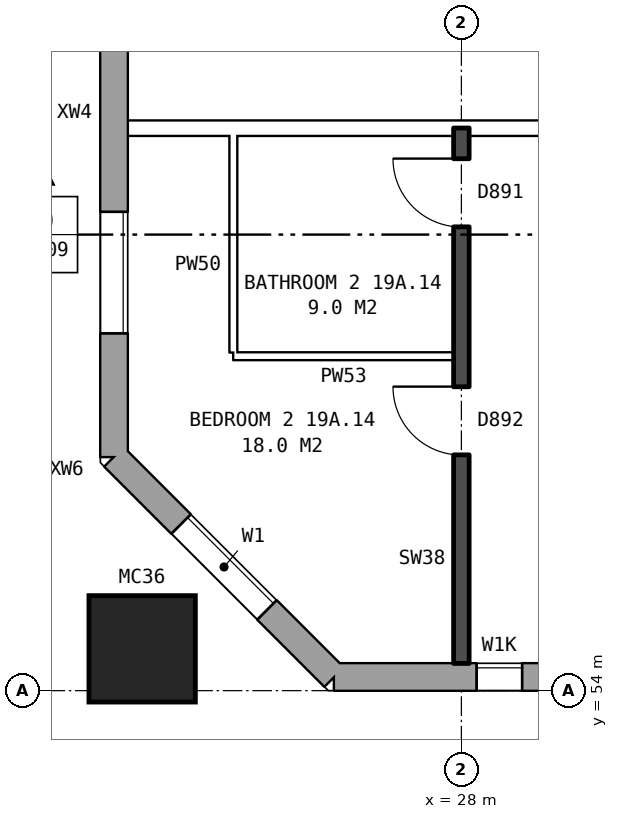
"""IFC4 building model, lengths in metres.
Left out: names, types, materials, properties, quantities, classifications, styles, units other than length and angle.
Written with IfcOpenShell. Run it as: python <this file> out.ifc"""

import sys

from ifc_helpers import new_model, si_unit, direction, frame, frame_2d, origin, origin_2d, place, context, subcontext, project, spatial, rectangle, hollow_rectangle, extrude, element, fill, save


model = new_model("IFC4")
c1 = context("Model", 3, precision=1e-05, world=origin(), true_north=direction((0.0, 1.0)))
c2 = subcontext(c1, "Body", "Model", "MODEL_VIEW")
j1 = project(units=[si_unit("LENGTHUNIT", "METRE"), si_unit("PLANEANGLEUNIT", "RADIAN")], contexts=[c1])
p1 = place(None, origin())
s1 = spatial("IfcSite", under=j1, at=p1, CompositionType="ELEMENT")
p2 = place(p1, origin())
s2 = spatial("IfcBuilding", under=s1, at=p2, CompositionType="ELEMENT")
p3 = place(p2, frame((0.0, 0.0, 71.6)))
s3 = spatial("IfcBuildingStorey", under=s2, at=p3, CompositionType="ELEMENT", Elevation=71.6)
p4 = place(p3, frame((23.8, 54.55, 0.0), z_axis=(0.0, 0.0, 1.0), x_axis=(1.0, 0.0, 0.0)))
e1 = element("IfcColumn", 1, at=p4, inside=s3, PredefinedType="COLUMN", context=c2, shape_type="SweptSolid", body=[
    extrude(hollow_rectangle(XDim=1.4, YDim=1.4, WallThickness=0.075, at=origin_2d()), origin(), (0.0, 0.0, 1.0), 3.1),
])
p5 = place(p3, frame((23.43, 57.075, 0.0), z_axis=(0.0, 0.0, 1.0), x_axis=(0.707106781187, -0.707106781187, 0.0)))
e2 = element("IfcWall", 2, at=p5, inside=s3, PredefinedType="STANDARD", context=c2, shape_type="SweptSolid", body=[
    extrude(rectangle(XDim=4.094, YDim=0.36, at=frame_2d((2.047, 0.0))), origin(), (0.0, 0.0, 1.0), 2.85),
])
p6 = place(p5, frame((1.247, 0.0, 0.8)))
e3 = element("IfcOpeningElement", 3, at=p6, cuts=e2, PredefinedType="OPENING", context=c2, shape_type="SweptSolid", body=[
    extrude(rectangle(XDim=1.6, YDim=1.8, at=frame_2d((0.8, 0.9))), frame((0.0, 0.19, 0.0), z_axis=(0.0, -1.0, 0.0), x_axis=(1.0, 0.0, 0.0)), (0.0, 0.0, 1.0), 0.38),
])
p7 = place(p3, frame((26.325, 54.18, 0.0), z_axis=(0.0, 0.0, 1.0), x_axis=(1.0, 0.0, 0.0)))
e4 = element("IfcWall", 4, at=p7, inside=s3, PredefinedType="STANDARD", context=c2, shape_type="SweptSolid", body=[
    extrude(rectangle(XDim=46.601, YDim=0.36, at=frame_2d((23.3, 0.0))), origin(), (0.0, 0.0, 1.0), 2.85),
])
p8 = place(p7, frame((1.875, 0.0, 1.0)))
e5 = element("IfcOpeningElement", 5, at=p8, cuts=e4, PredefinedType="OPENING", context=c2, shape_type="SweptSolid", body=[
    extrude(rectangle(XDim=0.6, YDim=1.5, at=frame_2d((0.3, 0.75))), frame((0.0, 0.19, 0.0), z_axis=(0.0, -1.0, 0.0), x_axis=(1.0, 0.0, 0.0)), (0.0, 0.0, 1.0), 0.38),
])
p9 = place(p7, frame((5.375, 0.0, 0.8)))
e6 = element("IfcOpeningElement", 6, at=p9, cuts=e4, PredefinedType="OPENING", context=c2, shape_type="SweptSolid", body=[
    extrude(rectangle(XDim=1.6, YDim=1.8, at=frame_2d((0.8, 0.9))), frame((0.0, 0.19, 0.0), z_axis=(0.0, -1.0, 0.0), x_axis=(1.0, 0.0, 0.0)), (0.0, 0.0, 1.0), 0.38),
])
p10 = place(p7, frame((8.375, 0.0, 0.8)))
e7 = element("IfcOpeningElement", 7, at=p10, cuts=e4, PredefinedType="OPENING", context=c2, shape_type="SweptSolid", body=[
    extrude(rectangle(XDim=1.6, YDim=1.8, at=frame_2d((0.8, 0.9))), frame((0.0, 0.19, 0.0), z_axis=(0.0, -1.0, 0.0), x_axis=(1.0, 0.0, 0.0)), (0.0, 0.0, 1.0), 0.38),
])
p11 = place(p7, frame((11.375, 0.0, 0.8)))
e8 = element("IfcOpeningElement", 8, at=p11, cuts=e4, PredefinedType="OPENING", context=c2, shape_type="SweptSolid", body=[
    extrude(rectangle(XDim=1.6, YDim=1.8, at=frame_2d((0.8, 0.9))), frame((0.0, 0.19, 0.0), z_axis=(0.0, -1.0, 0.0), x_axis=(1.0, 0.0, 0.0)), (0.0, 0.0, 1.0), 0.38),
])
p12 = place(p7, frame((14.375, 0.0, 0.8)))
e9 = element("IfcOpeningElement", 9, at=p12, cuts=e4, PredefinedType="OPENING", context=c2, shape_type="SweptSolid", body=[
    extrude(rectangle(XDim=1.6, YDim=1.8, at=frame_2d((0.8, 0.9))), frame((0.0, 0.19, 0.0), z_axis=(0.0, -1.0, 0.0), x_axis=(1.0, 0.0, 0.0)), (0.0, 0.0, 1.0), 0.38),
])
p13 = place(p7, frame((17.375, 0.0, 0.8)))
e10 = element("IfcOpeningElement", 10, at=p13, cuts=e4, PredefinedType="OPENING", context=c2, shape_type="SweptSolid", body=[
    extrude(rectangle(XDim=1.6, YDim=1.8, at=frame_2d((0.8, 0.9))), frame((0.0, 0.19, 0.0), z_axis=(0.0, -1.0, 0.0), x_axis=(1.0, 0.0, 0.0)), (0.0, 0.0, 1.0), 0.38),
])
p14 = place(p7, frame((20.375, 0.0, 0.8)))
e11 = element("IfcOpeningElement", 11, at=p14, cuts=e4, PredefinedType="OPENING", context=c2, shape_type="SweptSolid", body=[
    extrude(rectangle(XDim=1.6, YDim=1.8, at=frame_2d((0.8, 0.9))), frame((0.0, 0.19, 0.0), z_axis=(0.0, -1.0, 0.0), x_axis=(1.0, 0.0, 0.0)), (0.0, 0.0, 1.0), 0.38),
])
p15 = place(p7, frame((23.375, 0.0, 0.8)))
e12 = element("IfcOpeningElement", 12, at=p15, cuts=e4, PredefinedType="OPENING", context=c2, shape_type="SweptSolid", body=[
    extrude(rectangle(XDim=1.6, YDim=1.8, at=frame_2d((0.8, 0.9))), frame((0.0, 0.19, 0.0), z_axis=(0.0, -1.0, 0.0), x_axis=(1.0, 0.0, 0.0)), (0.0, 0.0, 1.0), 0.38),
])
p16 = place(p7, frame((26.375, 0.0, 0.8)))
e13 = element("IfcOpeningElement", 13, at=p16, cuts=e4, PredefinedType="OPENING", context=c2, shape_type="SweptSolid", body=[
    extrude(rectangle(XDim=1.6, YDim=1.8, at=frame_2d((0.8, 0.9))), frame((0.0, 0.19, 0.0), z_axis=(0.0, -1.0, 0.0), x_axis=(1.0, 0.0, 0.0)), (0.0, 0.0, 1.0), 0.38),
])
p17 = place(p7, frame((29.375, 0.0, 0.8)))
e14 = element("IfcOpeningElement", 14, at=p17, cuts=e4, PredefinedType="OPENING", context=c2, shape_type="SweptSolid", body=[
    extrude(rectangle(XDim=1.6, YDim=1.8, at=frame_2d((0.8, 0.9))), frame((0.0, 0.19, 0.0), z_axis=(0.0, -1.0, 0.0), x_axis=(1.0, 0.0, 0.0)), (0.0, 0.0, 1.0), 0.38),
])
p18 = place(p7, frame((32.375, 0.0, 0.8)))
e15 = element("IfcOpeningElement", 15, at=p18, cuts=e4, PredefinedType="OPENING", context=c2, shape_type="SweptSolid", body=[
    extrude(rectangle(XDim=1.6, YDim=1.8, at=frame_2d((0.8, 0.9))), frame((0.0, 0.19, 0.0), z_axis=(0.0, -1.0, 0.0), x_axis=(1.0, 0.0, 0.0)), (0.0, 0.0, 1.0), 0.38),
])
p19 = place(p7, frame((35.375, 0.0, 0.8)))
e16 = element("IfcOpeningElement", 16, at=p19, cuts=e4, PredefinedType="OPENING", context=c2, shape_type="SweptSolid", body=[
    extrude(rectangle(XDim=1.6, YDim=1.8, at=frame_2d((0.8, 0.9))), frame((0.0, 0.19, 0.0), z_axis=(0.0, -1.0, 0.0), x_axis=(1.0, 0.0, 0.0)), (0.0, 0.0, 1.0), 0.38),
])
p20 = place(p7, frame((38.375, 0.0, 0.8)))
e17 = element("IfcOpeningElement", 17, at=p20, cuts=e4, PredefinedType="OPENING", context=c2, shape_type="SweptSolid", body=[
    extrude(rectangle(XDim=1.6, YDim=1.8, at=frame_2d((0.8, 0.9))), frame((0.0, 0.19, 0.0), z_axis=(0.0, -1.0, 0.0), x_axis=(1.0, 0.0, 0.0)), (0.0, 0.0, 1.0), 0.38),
])
p21 = place(p7, frame((40.275, 0.0, 0.8)))
e18 = element("IfcOpeningElement", 18, at=p21, cuts=e4, PredefinedType="OPENING", context=c2, shape_type="SweptSolid", body=[
    extrude(rectangle(XDim=0.6, YDim=1.8, at=frame_2d((0.3, 0.9))), frame((0.0, 0.19, 0.0), z_axis=(0.0, -1.0, 0.0), x_axis=(1.0, 0.0, 0.0)), (0.0, 0.0, 1.0), 0.38),
])
p22 = place(p7, frame((44.375, 0.0, 0.8)))
e19 = element("IfcOpeningElement", 19, at=p22, cuts=e4, PredefinedType="OPENING", context=c2, shape_type="SweptSolid", body=[
    extrude(rectangle(XDim=1.6, YDim=1.8, at=frame_2d((0.8, 0.9))), frame((0.0, 0.19, 0.0), z_axis=(0.0, -1.0, 0.0), x_axis=(1.0, 0.0, 0.0)), (0.0, 0.0, 1.0), 0.38),
])
p23 = place(p7, frame((2.775, 0.0, 1.7)))
e20 = element("IfcOpeningElement", 20, at=p23, cuts=e4, PredefinedType="OPENING", context=c2, shape_type="SweptSolid", body=[
    extrude(rectangle(XDim=0.6, YDim=0.9, at=frame_2d((0.3, 0.45))), frame((0.0, 0.19, 0.0), z_axis=(0.0, -1.0, 0.0), x_axis=(1.0, 0.0, 0.0)), (0.0, 0.0, 1.0), 0.38),
])
p24 = place(p7, frame((41.175, 0.0, 0.8)))
e21 = element("IfcOpeningElement", 21, at=p24, cuts=e4, PredefinedType="OPENING", context=c2, shape_type="SweptSolid", body=[
    extrude(rectangle(XDim=0.8, YDim=0.9, at=frame_2d((0.4, 0.45))), frame((0.0, 0.19, 0.0), z_axis=(0.0, -1.0, 0.0), x_axis=(1.0, 0.0, 0.0)), (0.0, 0.0, 1.0), 0.38),
])
p25 = place(p3, frame((23.43, 82.925, 0.0), z_axis=(0.0, 0.0, 1.0), x_axis=(0.0, -1.0, 0.0)))
e22 = element("IfcWall", 22, at=p25, inside=s3, PredefinedType="STANDARD", context=c2, shape_type="SweptSolid", body=[
    extrude(rectangle(XDim=25.851, YDim=0.36, at=frame_2d((12.925, 0.0))), origin(), (0.0, 0.0, 1.0), 2.85),
])
p26 = place(p25, frame((1.625, 0.0, 0.8)))
e23 = element("IfcOpeningElement", 23, at=p26, cuts=e22, PredefinedType="OPENING", context=c2, shape_type="SweptSolid", body=[
    extrude(rectangle(XDim=1.6, YDim=1.8, at=frame_2d((0.8, 0.9))), frame((0.0, 0.19, 0.0), z_axis=(0.0, -1.0, 0.0), x_axis=(1.0, 0.0, 0.0)), (0.0, 0.0, 1.0), 0.38),
])
p27 = place(p25, frame((5.775, 0.0, 0.8)))
e24 = element("IfcOpeningElement", 24, at=p27, cuts=e22, PredefinedType="OPENING", context=c2, shape_type="SweptSolid", body=[
    extrude(rectangle(XDim=0.6, YDim=0.9, at=frame_2d((0.3, 0.45))), frame((0.0, 0.19, 0.0), z_axis=(0.0, -1.0, 0.0), x_axis=(1.0, 0.0, 0.0)), (0.0, 0.0, 1.0), 0.38),
])
p28 = place(p25, frame((7.625, 0.0, 0.8)))
e25 = element("IfcOpeningElement", 25, at=p28, cuts=e22, PredefinedType="OPENING", context=c2, shape_type="SweptSolid", body=[
    extrude(rectangle(XDim=1.6, YDim=1.8, at=frame_2d((0.8, 0.9))), frame((0.0, 0.19, 0.0), z_axis=(0.0, -1.0, 0.0), x_axis=(1.0, 0.0, 0.0)), (0.0, 0.0, 1.0), 0.38),
])
p29 = place(p25, frame((10.625, 0.0, 0.8)))
e26 = element("IfcOpeningElement", 26, at=p29, cuts=e22, PredefinedType="OPENING", context=c2, shape_type="SweptSolid", body=[
    extrude(rectangle(XDim=1.6, YDim=1.8, at=frame_2d((0.8, 0.9))), frame((0.0, 0.19, 0.0), z_axis=(0.0, -1.0, 0.0), x_axis=(1.0, 0.0, 0.0)), (0.0, 0.0, 1.0), 0.38),
])
p30 = place(p25, frame((13.625, 0.0, 0.8)))
e27 = element("IfcOpeningElement", 27, at=p30, cuts=e22, PredefinedType="OPENING", context=c2, shape_type="SweptSolid", body=[
    extrude(rectangle(XDim=1.6, YDim=1.8, at=frame_2d((0.8, 0.9))), frame((0.0, 0.19, 0.0), z_axis=(0.0, -1.0, 0.0), x_axis=(1.0, 0.0, 0.0)), (0.0, 0.0, 1.0), 0.38),
])
p31 = place(p25, frame((16.625, 0.0, 0.8)))
e28 = element("IfcOpeningElement", 28, at=p31, cuts=e22, PredefinedType="OPENING", context=c2, shape_type="SweptSolid", body=[
    extrude(rectangle(XDim=1.6, YDim=1.8, at=frame_2d((0.8, 0.9))), frame((0.0, 0.19, 0.0), z_axis=(0.0, -1.0, 0.0), x_axis=(1.0, 0.0, 0.0)), (0.0, 0.0, 1.0), 0.38),
])
p32 = place(p25, frame((6.675, 0.0, 0.8)))
e29 = element("IfcOpeningElement", 29, at=p32, cuts=e22, PredefinedType="OPENING", context=c2, shape_type="SweptSolid", body=[
    extrude(rectangle(XDim=0.6, YDim=1.5, at=frame_2d((0.3, 0.75))), frame((0.0, 0.19, 0.0), z_axis=(0.0, -1.0, 0.0), x_axis=(1.0, 0.0, 0.0)), (0.0, 0.0, 1.0), 0.38),
])
p33 = place(p25, frame((22.625, 0.0, 0.8)))
e30 = element("IfcOpeningElement", 30, at=p33, cuts=e22, PredefinedType="OPENING", context=c2, shape_type="SweptSolid", body=[
    extrude(rectangle(XDim=1.6, YDim=1.8, at=frame_2d((0.8, 0.9))), frame((0.0, 0.19, 0.0), z_axis=(0.0, -1.0, 0.0), x_axis=(1.0, 0.0, 0.0)), (0.0, 0.0, 1.0), 0.38),
])
p34 = place(p25, frame((9.525, 0.0, 0.8)))
e31 = element("IfcOpeningElement", 31, at=p34, cuts=e22, PredefinedType="OPENING", context=c2, shape_type="SweptSolid", body=[
    extrude(rectangle(XDim=0.8, YDim=1.8, at=frame_2d((0.4, 0.9))), frame((0.0, 0.19, 0.0), z_axis=(0.0, -1.0, 0.0), x_axis=(1.0, 0.0, 0.0)), (0.0, 0.0, 1.0), 0.38),
])
p35 = place(p25, frame((12.525, 0.0, 0.8)))
e32 = element("IfcOpeningElement", 32, at=p35, cuts=e22, PredefinedType="OPENING", context=c2, shape_type="SweptSolid", body=[
    extrude(rectangle(XDim=0.8, YDim=1.8, at=frame_2d((0.4, 0.9))), frame((0.0, 0.19, 0.0), z_axis=(0.0, -1.0, 0.0), x_axis=(1.0, 0.0, 0.0)), (0.0, 0.0, 1.0), 0.38),
])
p36 = place(p25, frame((15.525, 0.0, 0.8)))
e33 = element("IfcOpeningElement", 33, at=p36, cuts=e22, PredefinedType="OPENING", context=c2, shape_type="SweptSolid", body=[
    extrude(rectangle(XDim=0.8, YDim=1.8, at=frame_2d((0.4, 0.9))), frame((0.0, 0.19, 0.0), z_axis=(0.0, -1.0, 0.0), x_axis=(1.0, 0.0, 0.0)), (0.0, 0.0, 1.0), 0.38),
])
p37 = place(p25, frame((18.525, 0.0, 0.8)))
e34 = element("IfcOpeningElement", 34, at=p37, cuts=e22, PredefinedType="OPENING", context=c2, shape_type="SweptSolid", body=[
    extrude(rectangle(XDim=0.6, YDim=1.5, at=frame_2d((0.3, 0.75))), frame((0.0, 0.19, 0.0), z_axis=(0.0, -1.0, 0.0), x_axis=(1.0, 0.0, 0.0)), (0.0, 0.0, 1.0), 0.38),
])
p38 = place(p25, frame((19.425, 0.0, 0.8)))
e35 = element("IfcOpeningElement", 35, at=p38, cuts=e22, PredefinedType="OPENING", context=c2, shape_type="SweptSolid", body=[
    extrude(rectangle(XDim=0.6, YDim=0.9, at=frame_2d((0.3, 0.45))), frame((0.0, 0.19, 0.0), z_axis=(0.0, -1.0, 0.0), x_axis=(1.0, 0.0, 0.0)), (0.0, 0.0, 1.0), 0.38),
])
p39 = place(p3, frame((25.0, 58.4, 0.0), z_axis=(0.0, 0.0, 1.0), x_axis=(1.0, 0.0, 0.0)))
e36 = element("IfcWall", 36, at=p39, inside=s3, PredefinedType="PARTITIONING", context=c2, shape_type="SweptSolid", body=[
    extrude(rectangle(XDim=2.9, YDim=0.1, at=frame_2d((1.45, 0.0))), origin(), (0.0, 0.0, 1.0), 2.85),
])
p40 = place(p3, frame((23.61, 61.4, 0.0), z_axis=(0.0, 0.0, 1.0), x_axis=(1.0, 0.0, 0.0)))
e37 = element("IfcWall", 37, at=p40, inside=s3, PredefinedType="PARTITIONING", context=c2, shape_type="SweptSolid", body=[
    extrude(rectangle(XDim=22.29, YDim=0.2, at=frame_2d((11.145, 0.0))), origin(), (0.0, 0.0, 1.0), 2.85),
])
p41 = place(p40, frame((18.84, 0.0, 0.0)))
e38 = element("IfcOpeningElement", 38, at=p41, cuts=e37, PredefinedType="OPENING", context=c2, shape_type="SweptSolid", body=[
    extrude(rectangle(XDim=1.0, YDim=2.1, at=frame_2d((0.5, 1.05))), frame((0.0, 0.11, 0.0), z_axis=(0.0, -1.0, 0.0), x_axis=(1.0, 0.0, 0.0)), (0.0, 0.0, 1.0), 0.22),
])
p42 = place(p40, frame((6.89, 0.0, 0.0)))
e39 = element("IfcOpeningElement", 39, at=p42, cuts=e37, PredefinedType="OPENING", context=c2, shape_type="SweptSolid", body=[
    extrude(rectangle(XDim=1.0, YDim=2.1, at=frame_2d((0.5, 1.05))), frame((0.0, 0.11, 0.0), z_axis=(0.0, -1.0, 0.0), x_axis=(1.0, 0.0, 0.0)), (0.0, 0.0, 1.0), 0.22),
])
p43 = place(p3, frame((25.0, 58.45, 0.0), z_axis=(0.0, 0.0, 1.0), x_axis=(0.0, 1.0, 0.0)))
e40 = element("IfcWall", 40, at=p43, inside=s3, PredefinedType="PARTITIONING", context=c2, shape_type="SweptSolid", body=[
    extrude(rectangle(XDim=2.85, YDim=0.1, at=frame_2d((1.425, 0.0))), origin(), (0.0, 0.0, 1.0), 2.85),
])
p44 = place(p3, frame((28.0, 54.36, 0.0), z_axis=(0.0, 0.0, 1.0), x_axis=(0.0, 1.0, 0.0)))
e41 = element("IfcWall", 41, at=p44, inside=s3, PredefinedType="SOLIDWALL", context=c2, shape_type="SweptSolid", body=[
    extrude(rectangle(XDim=7.04, YDim=0.2, at=frame_2d((3.52, 0.0))), origin(), (0.0, 0.0, 1.0), 2.85),
])
p45 = place(p44, frame((2.74, 0.0, 0.0)))
e42 = element("IfcOpeningElement", 42, at=p45, cuts=e41, PredefinedType="OPENING", context=c2, shape_type="SweptSolid", body=[
    extrude(rectangle(XDim=0.9, YDim=2.1, at=frame_2d((0.45, 1.05))), frame((0.0, 0.11, 0.0), z_axis=(0.0, -1.0, 0.0), x_axis=(1.0, 0.0, 0.0)), (0.0, 0.0, 1.0), 0.22),
])
p46 = place(p44, frame((5.74, 0.0, 0.0)))
e43 = element("IfcOpeningElement", 43, at=p46, cuts=e41, PredefinedType="OPENING", context=c2, shape_type="SweptSolid", body=[
    extrude(rectangle(XDim=0.9, YDim=2.1, at=frame_2d((0.45, 1.05))), frame((0.0, 0.11, 0.0), z_axis=(0.0, -1.0, 0.0), x_axis=(1.0, 0.0, 0.0)), (0.0, 0.0, 1.0), 0.22),
])
p47 = place(p6, origin())
e44 = element("IfcWindow", 44, at=p47, inside=s3, PartitioningType="SINGLE_PANEL", PredefinedType="WINDOW", context=c2, shape_type="SweptSolid", body=[
    extrude(rectangle(XDim=1.6, YDim=1.8, at=frame_2d((0.8, 0.9))), frame((0.0, 0.15, 0.0), z_axis=(0.0, -1.0, 0.0), x_axis=(1.0, 0.0, 0.0)), (0.0, 0.0, 1.0), 0.06),
])
fill(e3, e44)
p48 = place(p8, origin())
e45 = element("IfcWindow", 45, at=p48, inside=s3, PartitioningType="SINGLE_PANEL", PredefinedType="WINDOW", context=c2, shape_type="SweptSolid", body=[
    extrude(rectangle(XDim=0.6, YDim=1.5, at=frame_2d((0.3, 0.75))), frame((0.0, 0.15, 0.0), z_axis=(0.0, -1.0, 0.0), x_axis=(1.0, 0.0, 0.0)), (0.0, 0.0, 1.0), 0.06),
])
fill(e5, e45)
p49 = place(p33, origin())
e46 = element("IfcWindow", 46, at=p49, inside=s3, PartitioningType="SINGLE_PANEL", PredefinedType="WINDOW", context=c2, shape_type="SweptSolid", body=[
    extrude(rectangle(XDim=1.6, YDim=1.8, at=frame_2d((0.8, 0.9))), frame((0.0, 0.15, 0.0), z_axis=(0.0, -1.0, 0.0), x_axis=(1.0, 0.0, 0.0)), (0.0, 0.0, 1.0), 0.06),
])
fill(e30, e46)
p50 = place(p45, origin())
e47 = element("IfcDoor", 47, at=p50, inside=s3, OperationType="SINGLE_SWING_RIGHT", PredefinedType="DOOR", context=c2, shape_type="SweptSolid", body=[
    extrude(rectangle(XDim=0.9, YDim=2.1, at=frame_2d((0.45, 1.05))), frame((0.0, 0.025, 0.0), z_axis=(0.0, -1.0, 0.0), x_axis=(1.0, 0.0, 0.0)), (0.0, 0.0, 1.0), 0.05),
])
fill(e42, e47)
p51 = place(p46, origin())
e48 = element("IfcDoor", 48, at=p51, inside=s3, OperationType="SINGLE_SWING_RIGHT", PredefinedType="DOOR", context=c2, shape_type="SweptSolid", body=[
    extrude(rectangle(XDim=0.9, YDim=2.1, at=frame_2d((0.45, 1.05))), frame((0.0, 0.025, 0.0), z_axis=(0.0, -1.0, 0.0), x_axis=(1.0, 0.0, 0.0)), (0.0, 0.0, 1.0), 0.05),
])
fill(e43, e48)
save(model, sys.argv[1])
